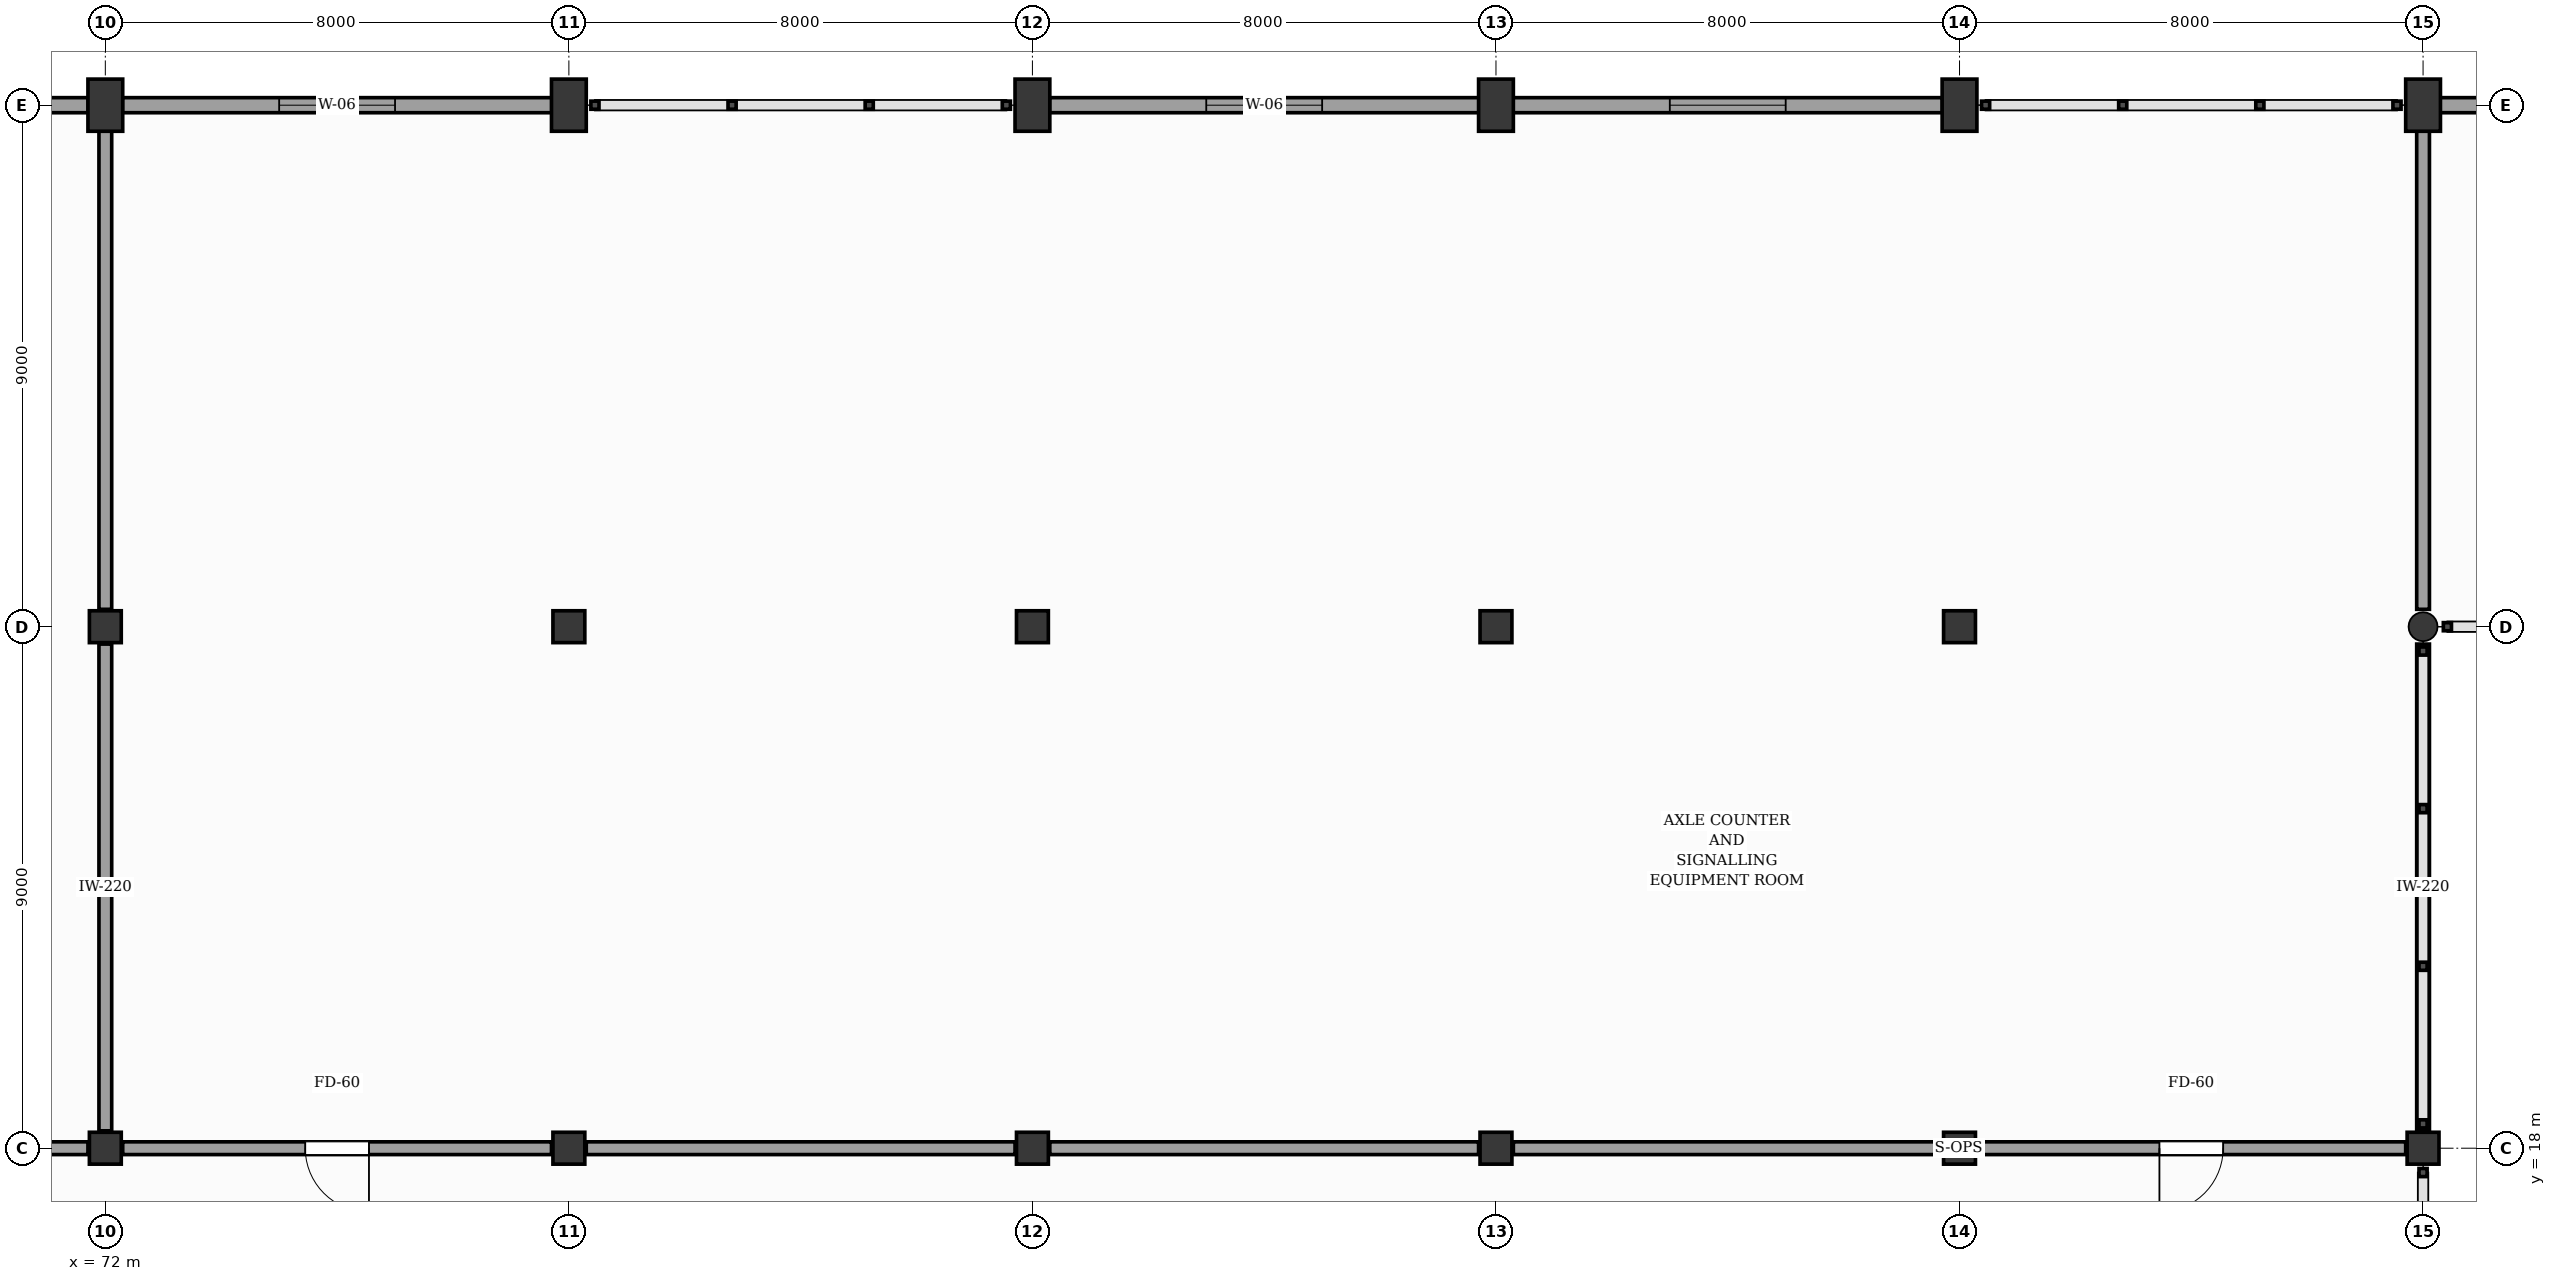
"""IFC4 building model, lengths in metres.
Left out: names, types, materials, properties, quantities, classifications, styles, units other than length and angle.
Written with IfcOpenShell. Run it as: python <this file> out.ifc"""

import sys

from ifc_helpers import new_model, si_unit, direction, frame, frame_2d, origin, origin_2d, place, context, subcontext, project, spatial, rectangle, circle, extrude, element, fill, save


model = new_model("IFC4")
c1 = context("Model", 3, precision=1e-05, world=origin(), true_north=direction((0.0, 1.0)))
c2 = subcontext(c1, "Body", "Model", "MODEL_VIEW")
j1 = project(units=[si_unit("LENGTHUNIT", "METRE"), si_unit("PLANEANGLEUNIT", "RADIAN")], contexts=[c1])
p1 = place(None, origin())
s1 = spatial("IfcSite", under=j1, at=p1, CompositionType="ELEMENT")
p2 = place(p1, origin())
s2 = spatial("IfcBuilding", under=s1, at=p2, CompositionType="ELEMENT")
p3 = place(p2, frame((0.0, 0.0, 20.4)))
s3 = spatial("IfcBuildingStorey", under=s2, at=p3, CompositionType="ELEMENT", Elevation=20.4)
for number, where, z_axis, x_axis in (
    (1, (72.0, 18.0, 0.0), (0.0, 0.0, 1.0), (1.0, 0.0, 0.0)),
    (2, (72.0, 27.0, 0.0), (0.0, 0.0, 1.0), (1.0, 0.0, 0.0)),
):
    element("IfcColumn", number, at=place(p3, frame(where, z_axis=z_axis, x_axis=x_axis)), inside=s3, PredefinedType="COLUMN", context=c2, shape_type="SweptSolid", body=[
        extrude(rectangle(XDim=0.55, YDim=0.55, at=origin_2d()), origin(), (0.0, 0.0, 1.0), 4.2),
    ])
p4 = place(p3, frame((72.0, 36.0, 0.0), z_axis=(0.0, 0.0, 1.0), x_axis=(1.0, 0.0, 0.0)))
e3 = element("IfcColumn", 3, at=p4, inside=s3, PredefinedType="COLUMN", context=c2, shape_type="SweptSolid", body=[
    extrude(rectangle(XDim=0.6, YDim=0.9, at=origin_2d()), origin(), (0.0, 0.0, 1.0), 4.2),
])
for number, where, z_axis, x_axis in (
    (4, (80.0, 18.0, 0.0), (0.0, 0.0, 1.0), (1.0, 0.0, 0.0)),
    (5, (80.0, 27.0, 0.0), (0.0, 0.0, 1.0), (1.0, 0.0, 0.0)),
):
    element("IfcColumn", number, at=place(p3, frame(where, z_axis=z_axis, x_axis=x_axis)), inside=s3, PredefinedType="COLUMN", context=c2, shape_type="SweptSolid", body=[
        extrude(rectangle(XDim=0.55, YDim=0.55, at=origin_2d()), origin(), (0.0, 0.0, 1.0), 4.2),
    ])
p5 = place(p3, frame((80.0, 36.0, 0.0), z_axis=(0.0, 0.0, 1.0), x_axis=(1.0, 0.0, 0.0)))
e6 = element("IfcColumn", 6, at=p5, inside=s3, PredefinedType="COLUMN", context=c2, shape_type="SweptSolid", body=[
    extrude(rectangle(XDim=0.6, YDim=0.9, at=origin_2d()), origin(), (0.0, 0.0, 1.0), 4.2),
])
for number, where, z_axis, x_axis in (
    (7, (88.0, 18.0, 0.0), (0.0, 0.0, 1.0), (1.0, 0.0, 0.0)),
    (8, (88.0, 27.0, 0.0), (0.0, 0.0, 1.0), (1.0, 0.0, 0.0)),
):
    element("IfcColumn", number, at=place(p3, frame(where, z_axis=z_axis, x_axis=x_axis)), inside=s3, PredefinedType="COLUMN", context=c2, shape_type="SweptSolid", body=[
        extrude(rectangle(XDim=0.55, YDim=0.55, at=origin_2d()), origin(), (0.0, 0.0, 1.0), 4.2),
    ])
p6 = place(p3, frame((88.0, 36.0, 0.0), z_axis=(0.0, 0.0, 1.0), x_axis=(1.0, 0.0, 0.0)))
e9 = element("IfcColumn", 9, at=p6, inside=s3, PredefinedType="COLUMN", context=c2, shape_type="SweptSolid", body=[
    extrude(rectangle(XDim=0.6, YDim=0.9, at=origin_2d()), origin(), (0.0, 0.0, 1.0), 4.2),
])
for number, where, z_axis, x_axis in (
    (10, (96.0, 18.0, 0.0), (0.0, 0.0, 1.0), (1.0, 0.0, 0.0)),
    (11, (96.0, 27.0, 0.0), (0.0, 0.0, 1.0), (1.0, 0.0, 0.0)),
):
    element("IfcColumn", number, at=place(p3, frame(where, z_axis=z_axis, x_axis=x_axis)), inside=s3, PredefinedType="COLUMN", context=c2, shape_type="SweptSolid", body=[
        extrude(rectangle(XDim=0.55, YDim=0.55, at=origin_2d()), origin(), (0.0, 0.0, 1.0), 4.2),
    ])
p7 = place(p3, frame((96.0, 36.0, 0.0), z_axis=(0.0, 0.0, 1.0), x_axis=(1.0, 0.0, 0.0)))
e12 = element("IfcColumn", 12, at=p7, inside=s3, PredefinedType="COLUMN", context=c2, shape_type="SweptSolid", body=[
    extrude(rectangle(XDim=0.6, YDim=0.9, at=origin_2d()), origin(), (0.0, 0.0, 1.0), 4.2),
])
for number, where, z_axis, x_axis in (
    (13, (104.0, 18.0, 0.0), (0.0, 0.0, 1.0), (1.0, 0.0, 0.0)),
    (14, (104.0, 27.0, 0.0), (0.0, 0.0, 1.0), (1.0, 0.0, 0.0)),
):
    element("IfcColumn", number, at=place(p3, frame(where, z_axis=z_axis, x_axis=x_axis)), inside=s3, PredefinedType="COLUMN", context=c2, shape_type="SweptSolid", body=[
        extrude(rectangle(XDim=0.55, YDim=0.55, at=origin_2d()), origin(), (0.0, 0.0, 1.0), 4.2),
    ])
p8 = place(p3, frame((104.0, 36.0, 0.0), z_axis=(0.0, 0.0, 1.0), x_axis=(1.0, 0.0, 0.0)))
e15 = element("IfcColumn", 15, at=p8, inside=s3, PredefinedType="COLUMN", context=c2, shape_type="SweptSolid", body=[
    extrude(rectangle(XDim=0.6, YDim=0.9, at=origin_2d()), origin(), (0.0, 0.0, 1.0), 4.2),
])
p9 = place(p3, frame((112.0, 18.0, 0.0), z_axis=(0.0, 0.0, 1.0), x_axis=(1.0, 0.0, 0.0)))
e16 = element("IfcColumn", 16, at=p9, inside=s3, PredefinedType="COLUMN", context=c2, shape_type="SweptSolid", body=[
    extrude(rectangle(XDim=0.55, YDim=0.55, at=origin_2d()), origin(), (0.0, 0.0, 1.0), 4.2),
])
p10 = place(p3, frame((112.0, 27.0, 0.0), z_axis=(0.0, 0.0, 1.0), x_axis=(1.0, 0.0, 0.0)))
e17 = element("IfcColumn", 17, at=p10, inside=s3, PredefinedType="COLUMN", context=c2, shape_type="SweptSolid", body=[
    extrude(circle(Radius=0.25, at=origin_2d()), origin(), (0.0, 0.0, 1.0), 4.2),
])
p11 = place(p3, frame((112.0, 36.0, 0.0), z_axis=(0.0, 0.0, 1.0), x_axis=(1.0, 0.0, 0.0)))
e18 = element("IfcColumn", 18, at=p11, inside=s3, PredefinedType="COLUMN", context=c2, shape_type="SweptSolid", body=[
    extrude(rectangle(XDim=0.6, YDim=0.9, at=origin_2d()), origin(), (0.0, 0.0, 1.0), 4.2),
])
p12 = place(p3, frame((64.295, 36.0, 0.0), z_axis=(0.0, 0.0, 1.0), x_axis=(1.0, 0.0, 0.0)))
e19 = element("IfcWall", 19, at=p12, inside=s3, PredefinedType="SOLIDWALL", context=c2, shape_type="SweptSolid", body=[
    extrude(rectangle(XDim=7.41, YDim=0.26, at=frame_2d((3.705, 0.0))), origin(), (0.0, 0.0, 1.0), 2.93),
])
p13 = place(p12, frame((2.705, 0.0, 1.45)))
e20 = element("IfcOpeningElement", 20, at=p13, cuts=e19, PredefinedType="OPENING", context=c2, shape_type="SweptSolid", body=[
    extrude(rectangle(XDim=2.0, YDim=1.34, at=frame_2d((1.0, 0.67))), frame((0.0, 0.14, 0.0), z_axis=(0.0, -1.0, 0.0), x_axis=(1.0, 0.0, 0.0)), (0.0, 0.0, 1.0), 0.28),
])
p14 = place(p3, frame((72.295, 36.0, 0.0), z_axis=(0.0, 0.0, 1.0), x_axis=(1.0, 0.0, 0.0)))
e21 = element("IfcWall", 21, at=p14, inside=s3, PredefinedType="SOLIDWALL", context=c2, shape_type="SweptSolid", body=[
    extrude(rectangle(XDim=7.41, YDim=0.26, at=frame_2d((3.705, 0.0))), origin(), (0.0, 0.0, 1.0), 2.93),
])
p15 = place(p14, frame((2.705, 0.0, 1.45)))
e22 = element("IfcOpeningElement", 22, at=p15, cuts=e21, PredefinedType="OPENING", context=c2, shape_type="SweptSolid", body=[
    extrude(rectangle(XDim=2.0, YDim=1.34, at=frame_2d((1.0, 0.67))), frame((0.0, 0.14, 0.0), z_axis=(0.0, -1.0, 0.0), x_axis=(1.0, 0.0, 0.0)), (0.0, 0.0, 1.0), 0.28),
])
p16 = place(p3, frame((88.295, 36.0, 0.0), z_axis=(0.0, 0.0, 1.0), x_axis=(1.0, 0.0, 0.0)))
e23 = element("IfcWall", 23, at=p16, inside=s3, PredefinedType="SOLIDWALL", context=c2, shape_type="SweptSolid", body=[
    extrude(rectangle(XDim=7.41, YDim=0.26, at=frame_2d((3.705, 0.0))), origin(), (0.0, 0.0, 1.0), 2.93),
])
p17 = place(p16, frame((2.705, 0.0, 1.45)))
e24 = element("IfcOpeningElement", 24, at=p17, cuts=e23, PredefinedType="OPENING", context=c2, shape_type="SweptSolid", body=[
    extrude(rectangle(XDim=2.0, YDim=1.34, at=frame_2d((1.0, 0.67))), frame((0.0, 0.14, 0.0), z_axis=(0.0, -1.0, 0.0), x_axis=(1.0, 0.0, 0.0)), (0.0, 0.0, 1.0), 0.28),
])
p18 = place(p3, frame((96.295, 36.0, 0.0), z_axis=(0.0, 0.0, 1.0), x_axis=(1.0, 0.0, 0.0)))
e25 = element("IfcWall", 25, at=p18, inside=s3, PredefinedType="SOLIDWALL", context=c2, shape_type="SweptSolid", body=[
    extrude(rectangle(XDim=7.41, YDim=0.26, at=frame_2d((3.705, 0.0))), origin(), (0.0, 0.0, 1.0), 2.93),
])
p19 = place(p18, frame((2.705, 0.0, 1.45)))
e26 = element("IfcOpeningElement", 26, at=p19, cuts=e25, PredefinedType="OPENING", context=c2, shape_type="SweptSolid", body=[
    extrude(rectangle(XDim=2.0, YDim=1.34, at=frame_2d((1.0, 0.67))), frame((0.0, 0.14, 0.0), z_axis=(0.0, -1.0, 0.0), x_axis=(1.0, 0.0, 0.0)), (0.0, 0.0, 1.0), 0.28),
])
p20 = place(p3, frame((112.295, 36.0, 0.0), z_axis=(0.0, 0.0, 1.0), x_axis=(1.0, 0.0, 0.0)))
e27 = element("IfcWall", 27, at=p20, inside=s3, PredefinedType="SOLIDWALL", context=c2, shape_type="SweptSolid", body=[
    extrude(rectangle(XDim=7.41, YDim=0.26, at=frame_2d((3.705, 0.0))), origin(), (0.0, 0.0, 1.0), 2.93),
])
p21 = place(p20, frame((2.705, 0.0, 1.45)))
e28 = element("IfcOpeningElement", 28, at=p21, cuts=e27, PredefinedType="OPENING", context=c2, shape_type="SweptSolid", body=[
    extrude(rectangle(XDim=2.0, YDim=1.34, at=frame_2d((1.0, 0.67))), frame((0.0, 0.14, 0.0), z_axis=(0.0, -1.0, 0.0), x_axis=(1.0, 0.0, 0.0)), (0.0, 0.0, 1.0), 0.28),
])
p22 = place(p3, frame((64.3, 18.0, 0.0), z_axis=(0.0, 0.0, 1.0), x_axis=(1.0, 0.0, 0.0)))
e29 = element("IfcWall", 29, at=p22, inside=s3, PredefinedType="SOLIDWALL", context=c2, shape_type="SweptSolid", body=[
    extrude(rectangle(XDim=7.4, YDim=0.22, at=frame_2d((3.7, 0.0))), origin(), (0.0, 0.0, 1.0), 3.1),
])
p23 = place(p22, frame((3.15, 0.0, 0.0)))
e30 = element("IfcOpeningElement", 30, at=p23, cuts=e29, PredefinedType="OPENING", context=c2, shape_type="SweptSolid", body=[
    extrude(rectangle(XDim=1.1, YDim=2.15, at=frame_2d((0.55, 1.075))), frame((0.0, 0.12, 0.0), z_axis=(0.0, -1.0, 0.0), x_axis=(1.0, 0.0, 0.0)), (0.0, 0.0, 1.0), 0.24),
])
p24 = place(p3, frame((72.0, 18.3, 0.0), z_axis=(0.0, 0.0, 1.0), x_axis=(0.0, 1.0, 0.0)))
e31 = element("IfcWall", 31, at=p24, inside=s3, PredefinedType="SOLIDWALL", context=c2, shape_type="SweptSolid", body=[
    extrude(rectangle(XDim=8.4, YDim=0.22, at=frame_2d((4.2, 0.0))), origin(), (0.0, 0.0, 1.0), 3.1),
])
p25 = place(p3, frame((72.0, 27.3, 0.0), z_axis=(0.0, 0.0, 1.0), x_axis=(0.0, 1.0, 0.0)))
e32 = element("IfcWall", 32, at=p25, inside=s3, PredefinedType="SOLIDWALL", context=c2, shape_type="SweptSolid", body=[
    extrude(rectangle(XDim=8.4, YDim=0.22, at=frame_2d((4.2, 0.0))), origin(), (0.0, 0.0, 1.0), 2.93),
])
p26 = place(p3, frame((72.3, 18.0, 0.0), z_axis=(0.0, 0.0, 1.0), x_axis=(1.0, 0.0, 0.0)))
e33 = element("IfcWall", 33, at=p26, inside=s3, PredefinedType="SOLIDWALL", context=c2, shape_type="SweptSolid", body=[
    extrude(rectangle(XDim=7.4, YDim=0.22, at=frame_2d((3.7, 0.0))), origin(), (0.0, 0.0, 1.0), 3.1),
])
p27 = place(p26, frame((3.15, 0.0, 0.0)))
e34 = element("IfcOpeningElement", 34, at=p27, cuts=e33, PredefinedType="OPENING", context=c2, shape_type="SweptSolid", body=[
    extrude(rectangle(XDim=1.1, YDim=2.15, at=frame_2d((0.55, 1.075))), frame((0.0, 0.12, 0.0), z_axis=(0.0, -1.0, 0.0), x_axis=(1.0, 0.0, 0.0)), (0.0, 0.0, 1.0), 0.24),
])
for number, where, z_axis, x_axis in (
    (35, (80.3, 18.0, 0.0), (0.0, 0.0, 1.0), (1.0, 0.0, 0.0)),
    (36, (88.3, 18.0, 0.0), (0.0, 0.0, 1.0), (1.0, 0.0, 0.0)),
    (37, (96.3, 18.0, 0.0), (0.0, 0.0, 1.0), (1.0, 0.0, 0.0)),
):
    element("IfcWall", number, at=place(p3, frame(where, z_axis=z_axis, x_axis=x_axis)), inside=s3, PredefinedType="SOLIDWALL", context=c2, shape_type="SweptSolid", body=[
        extrude(rectangle(XDim=7.4, YDim=0.22, at=frame_2d((3.7, 0.0))), origin(), (0.0, 0.0, 1.0), 3.1),
    ])
p28 = place(p3, frame((104.3, 18.0, 0.0), z_axis=(0.0, 0.0, 1.0), x_axis=(1.0, 0.0, 0.0)))
e38 = element("IfcWall", 38, at=p28, inside=s3, PredefinedType="SOLIDWALL", context=c2, shape_type="SweptSolid", body=[
    extrude(rectangle(XDim=7.4, YDim=0.22, at=frame_2d((3.7, 0.0))), origin(), (0.0, 0.0, 1.0), 3.1),
])
p29 = place(p28, frame((3.15, 0.0, 0.0)))
e39 = element("IfcOpeningElement", 39, at=p29, cuts=e38, PredefinedType="OPENING", context=c2, shape_type="SweptSolid", body=[
    extrude(rectangle(XDim=1.1, YDim=2.15, at=frame_2d((0.55, 1.075))), frame((0.0, 0.12, 0.0), z_axis=(0.0, -1.0, 0.0), x_axis=(1.0, 0.0, 0.0)), (0.0, 0.0, 1.0), 0.24),
])
p30 = place(p3, frame((112.0, 18.3, 0.0), z_axis=(0.0, 0.0, 1.0), x_axis=(0.0, 1.0, 0.0)))
e40 = element("IfcWall", 40, at=p30, inside=s3, PredefinedType="SOLIDWALL", context=c2, shape_type="SweptSolid", body=[
    extrude(rectangle(XDim=8.4, YDim=0.22, at=frame_2d((4.2, 0.0))), origin(), (0.0, 0.0, 1.0), 3.1),
])
p31 = place(p3, frame((112.0, 27.3, 0.0), z_axis=(0.0, 0.0, 1.0), x_axis=(0.0, 1.0, 0.0)))
e41 = element("IfcWall", 41, at=p31, inside=s3, PredefinedType="SOLIDWALL", context=c2, shape_type="SweptSolid", body=[
    extrude(rectangle(XDim=8.4, YDim=0.22, at=frame_2d((4.2, 0.0))), origin(), (0.0, 0.0, 1.0), 2.93),
])
p32 = place(p15, origin())
e42 = element("IfcWindow", 42, at=p32, inside=s3, PartitioningType="SINGLE_PANEL", PredefinedType="WINDOW", context=c2, shape_type="SweptSolid", body=[
    extrude(rectangle(XDim=2.0, YDim=1.34, at=frame_2d((1.0, 0.67))), frame((0.0, 0.03, 0.0), z_axis=(0.0, -1.0, 0.0), x_axis=(1.0, 0.0, 0.0)), (0.0, 0.0, 1.0), 0.06),
])
fill(e22, e42)
p33 = place(p17, origin())
e43 = element("IfcWindow", 43, at=p33, inside=s3, PartitioningType="SINGLE_PANEL", PredefinedType="WINDOW", context=c2, shape_type="SweptSolid", body=[
    extrude(rectangle(XDim=2.0, YDim=1.34, at=frame_2d((1.0, 0.67))), frame((0.0, 0.03, 0.0), z_axis=(0.0, -1.0, 0.0), x_axis=(1.0, 0.0, 0.0)), (0.0, 0.0, 1.0), 0.06),
])
fill(e24, e43)
p34 = place(p19, origin())
e44 = element("IfcWindow", 44, at=p34, inside=s3, PartitioningType="SINGLE_PANEL", PredefinedType="WINDOW", context=c2, shape_type="SweptSolid", body=[
    extrude(rectangle(XDim=2.0, YDim=1.34, at=frame_2d((1.0, 0.67))), frame((0.0, 0.03, 0.0), z_axis=(0.0, -1.0, 0.0), x_axis=(1.0, 0.0, 0.0)), (0.0, 0.0, 1.0), 0.06),
])
fill(e26, e44)
p35 = place(p27, frame((1.1, 0.0, 0.0), z_axis=(0.0, 0.0, 1.0), x_axis=(-1.0, 0.0, 0.0)))
e45 = element("IfcDoor", 45, at=p35, inside=s3, OperationType="SINGLE_SWING_RIGHT", PredefinedType="DOOR", context=c2, shape_type="SweptSolid", body=[
    extrude(rectangle(XDim=1.1, YDim=2.15, at=frame_2d((0.55, 1.075))), frame((0.0, 0.025, 0.0), z_axis=(0.0, -1.0, 0.0), x_axis=(1.0, 0.0, 0.0)), (0.0, 0.0, 1.0), 0.05),
])
fill(e34, e45)
p36 = place(p29, frame((1.1, 0.0, 0.0), z_axis=(0.0, 0.0, 1.0), x_axis=(-1.0, 0.0, 0.0)))
e46 = element("IfcDoor", 46, at=p36, inside=s3, OperationType="SINGLE_SWING_LEFT", PredefinedType="DOOR", context=c2, shape_type="SweptSolid", body=[
    extrude(rectangle(XDim=1.1, YDim=2.15, at=frame_2d((0.55, 1.075))), frame((0.0, 0.025, 0.0), z_axis=(0.0, -1.0, 0.0), x_axis=(1.0, 0.0, 0.0)), (0.0, 0.0, 1.0), 0.05),
])
fill(e39, e46)
save(model, sys.argv[1])
